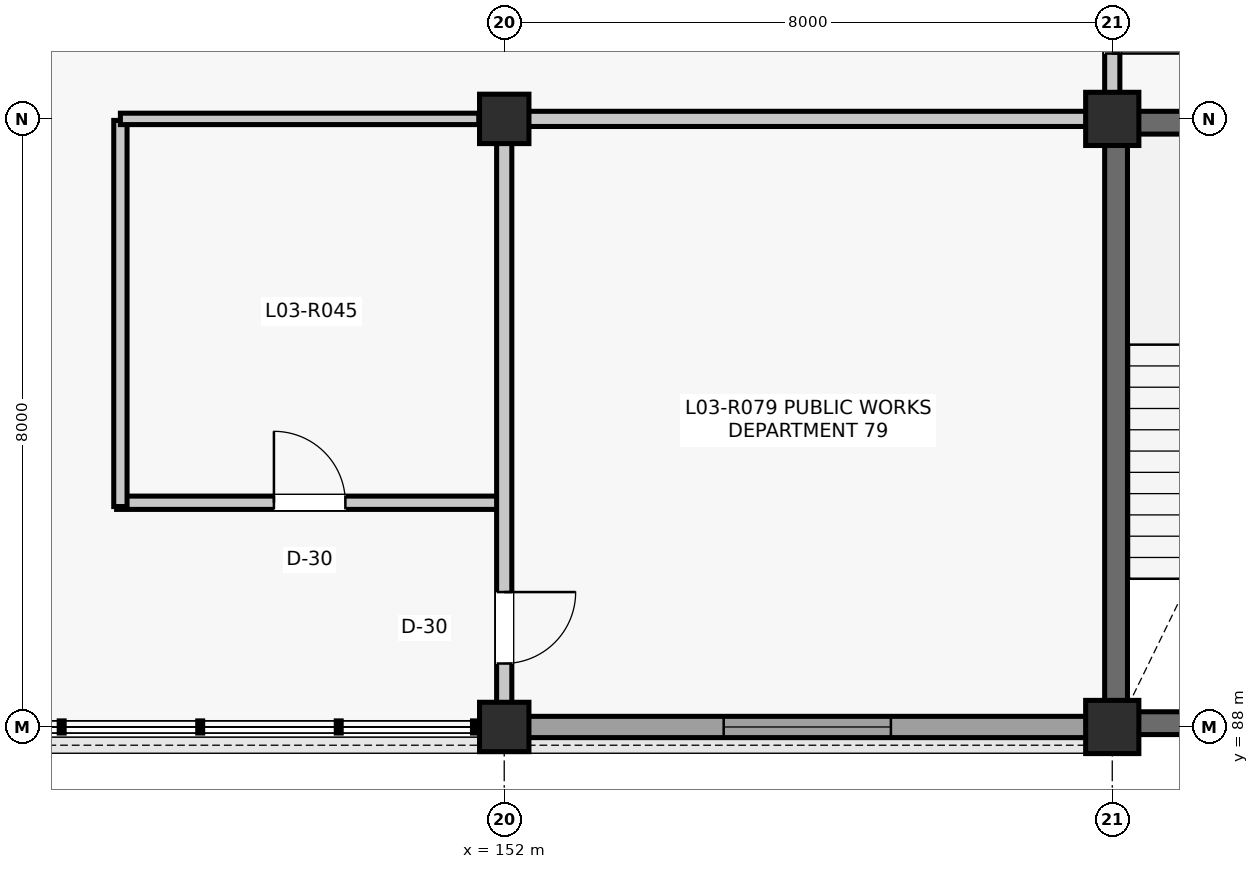
"""IFC4 building model, lengths in metres.
Left out: names, types, materials, properties, quantities, classifications, styles, units other than length and angle.
Written with IfcOpenShell. Run it as: python <this file> out.ifc"""

import sys

from ifc_helpers import new_model, si_unit, direction, frame, frame_2d, origin, origin_2d, place, context, subcontext, project, spatial, rectangle, extrude, element, fill, save


model = new_model("IFC4")
c1 = context("Model", 3, precision=1e-05, world=origin(), true_north=direction((0.0, 1.0)))
c2 = subcontext(c1, "Body", "Model", "MODEL_VIEW")
j1 = project(units=[si_unit("LENGTHUNIT", "METRE"), si_unit("PLANEANGLEUNIT", "RADIAN")], contexts=[c1])
p1 = place(None, origin())
s1 = spatial("IfcSite", under=j1, at=p1, CompositionType="ELEMENT")
p2 = place(p1, origin())
s2 = spatial("IfcBuilding", under=s1, at=p2, CompositionType="ELEMENT")
p3 = place(p2, frame((0.0, 0.0, 13.86)))
s3 = spatial("IfcBuildingStorey", under=s2, at=p3, CompositionType="ELEMENT", Elevation=13.86)
for number, where, z_axis, x_axis in (
    (1, (152.0, 88.0, 0.0), (0.0, 0.0, 1.0), (1.0, 0.0, 0.0)),
    (2, (152.0, 96.0, 0.0), (0.0, 0.0, 1.0), (1.0, 0.0, 0.0)),
):
    element("IfcColumn", number, at=place(p3, frame(where, z_axis=z_axis, x_axis=x_axis)), inside=s3, PredefinedType="COLUMN", context=c2, shape_type="SweptSolid", body=[
        extrude(rectangle(XDim=0.65, YDim=0.65, at=origin_2d()), origin(), (0.0, 0.0, 1.0), 3.96),
    ])
for number, where, z_axis, x_axis in (
    (3, (160.0, 88.0, 0.0), (0.0, 0.0, 1.0), (1.0, 0.0, 0.0)),
    (4, (160.0, 96.0, 0.0), (0.0, 0.0, 1.0), (1.0, 0.0, 0.0)),
):
    element("IfcColumn", number, at=place(p3, frame(where, z_axis=z_axis, x_axis=x_axis)), inside=s3, PredefinedType="COLUMN", context=c2, shape_type="SweptSolid", body=[
        extrude(rectangle(XDim=0.7, YDim=0.7, at=origin_2d()), origin(), (0.0, 0.0, 1.0), 3.96),
    ])
p4 = place(p3, frame((152.31, 88.0, 0.0), z_axis=(0.0, 0.0, 1.0), x_axis=(1.0, 0.0, 0.0)))
e5 = element("IfcWall", 5, at=p4, inside=s3, PredefinedType="SOLIDWALL", context=c2, shape_type="SweptSolid", body=[
    extrude(rectangle(XDim=7.355, YDim=0.28, at=frame_2d((3.677, 0.0))), origin(), (0.0, 0.0, 1.0), 3.364),
])
p5 = place(p4, frame((2.577, 0.0, 1.35)))
e6 = element("IfcOpeningElement", 6, at=p5, cuts=e5, PredefinedType="OPENING", context=c2, shape_type="SweptSolid", body=[
    extrude(rectangle(XDim=2.2, YDim=1.3, at=frame_2d((1.1, 0.65))), frame((0.0, 0.15, 0.0), z_axis=(0.0, -1.0, 0.0), x_axis=(1.0, 0.0, 0.0)), (0.0, 0.0, 1.0), 0.3),
])
for number, where, z_axis, x_axis in (
    (7, (160.05, 88.24, 0.0), (0.0, 0.0, 1.0), (0.0, 1.0, 0.0)),
    (8, (160.24, 95.95, 0.0), (0.0, 0.0, 1.0), (1.0, 0.0, 0.0)),
):
    element("IfcWall", number, at=place(p3, frame(where, z_axis=z_axis, x_axis=x_axis)), inside=s3, PredefinedType="SHEAR", context=c2, shape_type="SweptSolid", body=[
        extrude(rectangle(XDim=7.52, YDim=0.3, at=frame_2d((3.76, 0.0))), origin(), (0.0, 0.0, 1.0), 3.725),
    ])
p6 = place(p3, frame((160.24, 88.05, 0.0), z_axis=(0.0, 0.0, 1.0), x_axis=(1.0, 0.0, 0.0)))
e9 = element("IfcWall", 9, at=p6, inside=s3, PredefinedType="SHEAR", context=c2, shape_type="SweptSolid", body=[
    extrude(rectangle(XDim=3.91, YDim=0.3, at=frame_2d((1.955, 0.0))), origin(), (0.0, 0.0, 1.0), 3.725),
])
p7 = place(p3, frame((146.9, 90.95, 0.0), z_axis=(0.0, 0.0, 1.0), x_axis=(1.0, 0.0, 0.0)))
e10 = element("IfcWall", 10, at=p7, inside=s3, PredefinedType="PARTITIONING", context=c2, shape_type="SweptSolid", body=[
    extrude(rectangle(XDim=5.08, YDim=0.175, at=frame_2d((2.54, 0.0))), origin(), (0.0, 0.0, 1.0), 3.247),
])
p8 = place(p7, frame((2.07, 0.0, 0.0)))
e11 = element("IfcOpeningElement", 11, at=p8, cuts=e10, PredefinedType="OPENING", context=c2, shape_type="SweptSolid", body=[
    extrude(rectangle(XDim=0.94, YDim=2.12, at=frame_2d((0.47, 1.06))), frame((0.0, 0.097, 0.0), z_axis=(0.0, -1.0, 0.0), x_axis=(1.0, 0.0, 0.0)), (0.0, 0.0, 1.0), 0.195),
])
p9 = place(p3, frame((146.95, 90.9, 0.0), z_axis=(0.0, 0.0, 1.0), x_axis=(0.0, 1.0, 0.0)))
e12 = element("IfcWall", 12, at=p9, inside=s3, PredefinedType="PARTITIONING", context=c2, shape_type="SweptSolid", body=[
    extrude(rectangle(XDim=5.08, YDim=0.175, at=frame_2d((2.54, 0.0))), origin(), (0.0, 0.0, 1.0), 3.241),
])
p10 = place(p3, frame((146.95, 96.0, 0.0), z_axis=(0.0, 0.0, 1.0), x_axis=(1.0, 0.0, 0.0)))
e13 = element("IfcWall", 13, at=p10, inside=s3, PredefinedType="PARTITIONING", context=c2, shape_type="SweptSolid", body=[
    extrude(rectangle(XDim=4.715, YDim=0.15, at=frame_2d((2.357, 0.0))), origin(), (0.0, 0.0, 1.0), 3.241),
])
p11 = place(p3, frame((152.0, 88.315, 0.0), z_axis=(0.0, 0.0, 1.0), x_axis=(0.0, 1.0, 0.0)))
e14 = element("IfcWall", 14, at=p11, inside=s3, PredefinedType="PARTITIONING", context=c2, shape_type="SweptSolid", body=[
    extrude(rectangle(XDim=7.37, YDim=0.2, at=frame_2d((3.685, 0.0))), origin(), (0.0, 0.0, 1.0), 3.247),
])
p12 = place(p11, frame((0.52, 0.0, 0.0)))
e15 = element("IfcOpeningElement", 15, at=p12, cuts=e14, PredefinedType="OPENING", context=c2, shape_type="SweptSolid", body=[
    extrude(rectangle(XDim=0.94, YDim=2.12, at=frame_2d((0.47, 1.06))), frame((0.0, 0.11, 0.0), z_axis=(0.0, -1.0, 0.0), x_axis=(1.0, 0.0, 0.0)), (0.0, 0.0, 1.0), 0.22),
])
p13 = place(p3, frame((152.315, 96.0, 0.0), z_axis=(0.0, 0.0, 1.0), x_axis=(1.0, 0.0, 0.0)))
e16 = element("IfcWall", 16, at=p13, inside=s3, PredefinedType="PARTITIONING", context=c2, shape_type="SweptSolid", body=[
    extrude(rectangle(XDim=7.345, YDim=0.2, at=frame_2d((3.672, 0.0))), origin(), (0.0, 0.0, 1.0), 3.452),
])
p14 = place(p3, frame((160.0, 96.34, 0.0), z_axis=(0.0, 0.0, 1.0), x_axis=(0.0, 1.0, 0.0)))
e17 = element("IfcWall", 17, at=p14, inside=s3, PredefinedType="PARTITIONING", context=c2, shape_type="SweptSolid", body=[
    extrude(rectangle(XDim=7.345, YDim=0.2, at=frame_2d((3.672, 0.0))), origin(), (0.0, 0.0, 1.0), 3.452),
])
p15 = place(p14, frame((0.52, 0.0, 0.0)))
e18 = element("IfcOpeningElement", 18, at=p15, cuts=e17, PredefinedType="OPENING", context=c2, shape_type="SweptSolid", body=[
    extrude(rectangle(XDim=0.94, YDim=2.12, at=frame_2d((0.47, 1.06))), frame((0.0, 0.11, 0.0), z_axis=(0.0, -1.0, 0.0), x_axis=(1.0, 0.0, 0.0)), (0.0, 0.0, 1.0), 0.22),
])
p16 = place(p5, origin())
e19 = element("IfcWindow", 19, at=p16, inside=s3, PartitioningType="SINGLE_PANEL", PredefinedType="WINDOW", context=c2, shape_type="SweptSolid", body=[
    extrude(rectangle(XDim=2.2, YDim=1.3, at=frame_2d((1.1, 0.65))), frame((0.0, 0.03, 0.0), z_axis=(0.0, -1.0, 0.0), x_axis=(1.0, 0.0, 0.0)), (0.0, 0.0, 1.0), 0.06),
])
fill(e6, e19)
p17 = place(p8, origin())
e20 = element("IfcDoor", 20, at=p17, inside=s3, OperationType="SINGLE_SWING_LEFT", PredefinedType="DOOR", context=c2, shape_type="SweptSolid", body=[
    extrude(rectangle(XDim=0.94, YDim=2.12, at=frame_2d((0.47, 1.06))), frame((0.0, 0.025, 0.0), z_axis=(0.0, -1.0, 0.0), x_axis=(1.0, 0.0, 0.0)), (0.0, 0.0, 1.0), 0.05),
])
fill(e11, e20)
p18 = place(p12, frame((0.94, 0.0, 0.0), z_axis=(0.0, 0.0, 1.0), x_axis=(-1.0, 0.0, 0.0)))
e21 = element("IfcDoor", 21, at=p18, inside=s3, OperationType="SINGLE_SWING_RIGHT", PredefinedType="DOOR", context=c2, shape_type="SweptSolid", body=[
    extrude(rectangle(XDim=0.94, YDim=2.12, at=frame_2d((0.47, 1.06))), frame((0.0, 0.025, 0.0), z_axis=(0.0, -1.0, 0.0), x_axis=(1.0, 0.0, 0.0)), (0.0, 0.0, 1.0), 0.05),
])
fill(e15, e21)
p19 = place(p15, frame((0.94, 0.0, 0.0), z_axis=(0.0, 0.0, 1.0), x_axis=(-1.0, 0.0, 0.0)))
e22 = element("IfcDoor", 22, at=p19, inside=s3, OperationType="SINGLE_SWING_LEFT", PredefinedType="DOOR", context=c2, shape_type="SweptSolid", body=[
    extrude(rectangle(XDim=0.94, YDim=2.12, at=frame_2d((0.47, 1.06))), frame((0.0, 0.025, 0.0), z_axis=(0.0, -1.0, 0.0), x_axis=(1.0, 0.0, 0.0)), (0.0, 0.0, 1.0), 0.05),
])
fill(e18, e22)
save(model, sys.argv[1])
